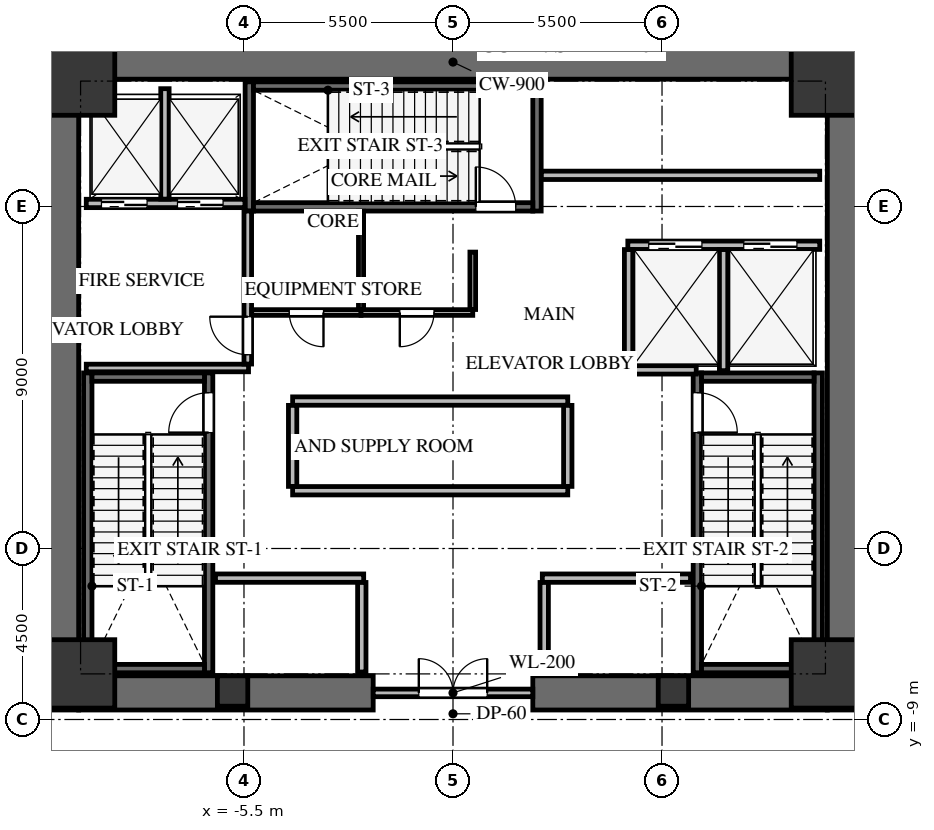
"""IFC4 building model, lengths in metres.
Left out: names, types, materials, properties, quantities, classifications, styles, units other than length and angle.
Written with IfcOpenShell. Run it as: python <this file> out.ifc"""

import sys

from ifc_helpers import new_model, si_unit, direction, frame, frame_2d, origin, origin_2d, place, context, subcontext, project, spatial, rectangle, extrude, source, transform, mapped, element, fill, save


model = new_model("IFC4")
c1 = context("Model", 3, precision=1e-05, world=origin(), true_north=direction((0.0, 1.0)))
c2 = subcontext(c1, "Body", "Model", "MODEL_VIEW")
j1 = project(units=[si_unit("LENGTHUNIT", "METRE"), si_unit("PLANEANGLEUNIT", "RADIAN")], contexts=[c1])
p1 = place(None, origin())
s1 = spatial("IfcSite", under=j1, at=p1, CompositionType="ELEMENT")
p2 = place(p1, origin())
s2 = spatial("IfcBuilding", under=s1, at=p2, CompositionType="ELEMENT")
p3 = place(p2, frame((0.0, 0.0, -5.0)))
s3 = spatial("IfcBuildingStorey", under=s2, at=p3, CompositionType="ELEMENT", Elevation=-5.0)
for number, where, z_axis, x_axis in (
    (1, (-10.3, -8.75, 0.0), (0.0, 0.0, 1.0), (0.0, 1.0, 0.0)),
    (2, (10.3, -8.75, 0.0), (0.0, 0.0, 1.0), (0.0, 1.0, 0.0)),
):
    element("IfcWall", number, at=place(p3, frame(where, z_axis=z_axis, x_axis=x_axis)), inside=s3, PredefinedType="SHEAR", context=c2, shape_type="SweptSolid", body=[
        extrude(rectangle(XDim=17.5, YDim=0.9, at=frame_2d((8.75, 0.0))), origin(), (0.0, 0.0, 1.0), 5.0),
    ])
for number, where, z_axis, x_axis in (
    (3, (-9.85, -8.3, 0.0), (0.0, 0.0, 1.0), (1.0, 0.0, 0.0)),
    (4, (2.1, -8.3, 0.0), (0.0, 0.0, 1.0), (1.0, 0.0, 0.0)),
):
    element("IfcWall", number, at=place(p3, frame(where, z_axis=z_axis, x_axis=x_axis)), inside=s3, PredefinedType="SHEAR", context=c2, shape_type="SweptSolid", body=[
        extrude(rectangle(XDim=7.75, YDim=0.9, at=frame_2d((3.875, 0.0))), origin(), (0.0, 0.0, 1.0), 5.0),
    ])
p4 = place(p3, frame((-9.85, 8.3, 0.0), z_axis=(0.0, 0.0, 1.0), x_axis=(1.0, 0.0, 0.0)))
e5 = element("IfcWall", 5, at=p4, inside=s3, PredefinedType="SHEAR", context=c2, shape_type="SweptSolid", body=[
    extrude(rectangle(XDim=19.7, YDim=0.9, at=frame_2d((9.85, 0.0))), origin(), (0.0, 0.0, 1.0), 5.0),
])
p5 = place(p3, frame((-6.43, -7.77, -0.35), z_axis=(0.0, 0.0, 1.0), x_axis=(0.0, 1.0, 0.0)))
e6 = element("IfcWall", 6, at=p5, inside=s3, PredefinedType="SHEAR", context=c2, shape_type="SweptSolid", body=[
    extrude(rectangle(XDim=7.89, YDim=0.22, at=frame_2d((3.945, 0.0))), origin(), (0.0, 0.0, 1.0), 5.05),
])
p6 = place(p5, frame((6.32, 0.0, 0.0)))
e7 = element("IfcOpeningElement", 7, at=p6, cuts=e6, PredefinedType="OPENING", context=c2, shape_type="SweptSolid", body=[
    extrude(rectangle(XDim=1.05, YDim=2.15, at=frame_2d((0.525, 1.075))), frame((0.0, 0.12, 0.0), z_axis=(0.0, -1.0, 0.0), x_axis=(1.0, 0.0, 0.0)), (0.0, 0.0, 1.0), 0.24),
])
p7 = place(p3, frame((-9.61, 0.12, -0.35), z_axis=(0.0, 0.0, 1.0), x_axis=(0.0, -1.0, 0.0)))
e8 = element("IfcWall", 8, at=p7, inside=s3, PredefinedType="SHEAR", context=c2, shape_type="SweptSolid", body=[
    extrude(rectangle(XDim=7.89, YDim=0.22, at=frame_2d((3.945, 0.0))), origin(), (0.0, 0.0, 1.0), 5.05),
])
for number, where, z_axis, x_axis in (
    (9, (-9.5, -7.66, -0.35), (0.0, 0.0, 1.0), (1.0, 0.0, 0.0)),
    (10, (-6.54, 0.01, -0.35), (0.0, 0.0, 1.0), (-1.0, 0.0, 0.0)),
):
    element("IfcWall", number, at=place(p3, frame(where, z_axis=z_axis, x_axis=x_axis)), inside=s3, PredefinedType="SHEAR", context=c2, shape_type="SweptSolid", body=[
        extrude(rectangle(XDim=2.96, YDim=0.22, at=frame_2d((1.48, 0.0))), origin(), (0.0, 0.0, 1.0), 5.05),
    ])
p8 = place(p3, frame((9.61, -7.77, -0.35), z_axis=(0.0, 0.0, 1.0), x_axis=(0.0, 1.0, 0.0)))
e11 = element("IfcWall", 11, at=p8, inside=s3, PredefinedType="SHEAR", context=c2, shape_type="SweptSolid", body=[
    extrude(rectangle(XDim=7.89, YDim=0.22, at=frame_2d((3.945, 0.0))), origin(), (0.0, 0.0, 1.0), 5.05),
])
p9 = place(p3, frame((6.43, 0.12, -0.35), z_axis=(0.0, 0.0, 1.0), x_axis=(0.0, -1.0, 0.0)))
e12 = element("IfcWall", 12, at=p9, inside=s3, PredefinedType="SHEAR", context=c2, shape_type="SweptSolid", body=[
    extrude(rectangle(XDim=7.89, YDim=0.22, at=frame_2d((3.945, 0.0))), origin(), (0.0, 0.0, 1.0), 5.05),
])
p10 = place(p9, frame((0.52, 0.0, 0.0)))
e13 = element("IfcOpeningElement", 13, at=p10, cuts=e12, PredefinedType="OPENING", context=c2, shape_type="SweptSolid", body=[
    extrude(rectangle(XDim=1.05, YDim=2.15, at=frame_2d((0.525, 1.075))), frame((0.0, 0.12, 0.0), z_axis=(0.0, -1.0, 0.0), x_axis=(1.0, 0.0, 0.0)), (0.0, 0.0, 1.0), 0.24),
])
for number, where, z_axis, x_axis in (
    (14, (6.54, -7.66, -0.35), (0.0, 0.0, 1.0), (1.0, 0.0, 0.0)),
    (15, (9.5, 0.01, -0.35), (0.0, 0.0, 1.0), (-1.0, 0.0, 0.0)),
):
    element("IfcWall", number, at=place(p3, frame(where, z_axis=z_axis, x_axis=x_axis)), inside=s3, PredefinedType="SHEAR", context=c2, shape_type="SweptSolid", body=[
        extrude(rectangle(XDim=2.96, YDim=0.22, at=frame_2d((1.48, 0.0))), origin(), (0.0, 0.0, 1.0), 5.05),
    ])
for number, where, z_axis, x_axis in (
    (16, (2.21, 4.38, -0.35), (0.0, 0.0, 1.0), (0.0, 1.0, 0.0)),
    (17, (-5.36, 7.78, -0.35), (0.0, 0.0, 1.0), (0.0, -1.0, 0.0)),
):
    element("IfcWall", number, at=place(p3, frame(where, z_axis=z_axis, x_axis=x_axis)), inside=s3, PredefinedType="SHEAR", context=c2, shape_type="SweptSolid", body=[
        extrude(rectangle(XDim=3.4, YDim=0.22, at=frame_2d((1.7, 0.0))), origin(), (0.0, 0.0, 1.0), 5.05),
    ])
p11 = place(p3, frame((-5.25, 4.49, -0.35), z_axis=(0.0, 0.0, 1.0), x_axis=(1.0, 0.0, 0.0)))
e18 = element("IfcWall", 18, at=p11, inside=s3, PredefinedType="SHEAR", context=c2, shape_type="SweptSolid", body=[
    extrude(rectangle(XDim=7.35, YDim=0.22, at=frame_2d((3.675, 0.0))), origin(), (0.0, 0.0, 1.0), 5.05),
])
p12 = place(p11, frame((5.85, 0.0, 0.0)))
e19 = element("IfcOpeningElement", 19, at=p12, cuts=e18, PredefinedType="OPENING", context=c2, shape_type="SweptSolid", body=[
    extrude(rectangle(XDim=1.05, YDim=2.15, at=frame_2d((0.525, 1.075))), frame((0.0, 0.12, 0.0), z_axis=(0.0, -1.0, 0.0), x_axis=(1.0, 0.0, 0.0)), (0.0, 0.0, 1.0), 0.24),
])
p13 = place(p3, frame((2.1, 7.67, -0.35), z_axis=(0.0, 0.0, 1.0), x_axis=(-1.0, 0.0, 0.0)))
e20 = element("IfcWall", 20, at=p13, inside=s3, PredefinedType="SHEAR", context=c2, shape_type="SweptSolid", body=[
    extrude(rectangle(XDim=7.35, YDim=0.22, at=frame_2d((3.675, 0.0))), origin(), (0.0, 0.0, 1.0), 5.05),
])
m1 = source(origin(), c2, "Body", "SweptSolid", [
    extrude(rectangle(XDim=1.8, YDim=1.8, at=origin_2d()), origin(), (0.0, 0.0, 1.0), 5.05),
])
for number, where, z_axis, x_axis in (
    (21, (-9.8, -7.8, -0.35), (0.0, 0.0, 1.0), (1.0, 0.0, 0.0)),
    (22, (9.8, -7.8, -0.35), (0.0, 0.0, 1.0), (1.0, 0.0, 0.0)),
    (23, (9.8, 7.8, -0.35), (0.0, 0.0, 1.0), (1.0, 0.0, 0.0)),
    (24, (-9.8, 7.8, -0.35), (0.0, 0.0, 1.0), (1.0, 0.0, 0.0)),
):
    element("IfcColumn", number, at=place(p3, frame(where, z_axis=z_axis, x_axis=x_axis)), inside=s3, PredefinedType="COLUMN", context=c2, shape_type="MappedRepresentation", body=[
        mapped(m1, transform((0.0, 0.0, 0.0), x_axis=(1.0, 0.0, 0.0), y_axis=(0.0, 1.0, 0.0), z_axis=(0.0, 0.0, 1.0), scale=1.0)),
    ])
m2 = source(origin(), c2, "Body", "SweptSolid", [
    extrude(rectangle(XDim=0.8, YDim=0.8, at=origin_2d()), origin(), (0.0, 0.0, 1.0), 5.05),
])
for number, where, z_axis, x_axis in (
    (25, (-5.8, -8.25, -0.35), (0.0, 0.0, 1.0), (1.0, 0.0, 0.0)),
    (26, (5.8, -8.25, -0.35), (0.0, 0.0, 1.0), (1.0, 0.0, 0.0)),
):
    element("IfcColumn", number, at=place(p3, frame(where, z_axis=z_axis, x_axis=x_axis)), inside=s3, PredefinedType="PILASTER", context=c2, shape_type="MappedRepresentation", body=[
        mapped(m2, transform((0.0, 0.0, 0.0), x_axis=(1.0, 0.0, 0.0), y_axis=(0.0, 1.0, 0.0), z_axis=(0.0, 0.0, 1.0), scale=1.0)),
    ])
p14 = place(p3, frame((-2.1, -8.3, 0.0), z_axis=(0.0, 0.0, 1.0), x_axis=(1.0, 0.0, 0.0)))
e27 = element("IfcWall", 27, at=p14, inside=s3, PredefinedType="SOLIDWALL", context=c2, shape_type="SweptSolid", body=[
    extrude(rectangle(XDim=4.2, YDim=0.2, at=frame_2d((2.1, 0.0))), origin(), (0.0, 0.0, 1.0), 4.685),
])
p15 = place(p14, frame((1.2, 0.0, 0.0)))
e28 = element("IfcOpeningElement", 28, at=p15, cuts=e27, PredefinedType="OPENING", context=c2, shape_type="SweptSolid", body=[
    extrude(rectangle(XDim=1.8, YDim=2.15, at=frame_2d((0.9, 1.075))), frame((0.0, 0.11, 0.0), z_axis=(0.0, -1.0, 0.0), x_axis=(1.0, 0.0, 0.0)), (0.0, 0.0, 1.0), 0.22),
])
p16 = place(p3, frame((-9.65, 4.58, 0.0), z_axis=(0.0, 0.0, 1.0), x_axis=(1.0, 0.0, 0.0)))
e29 = element("IfcWall", 29, at=p16, inside=s3, PredefinedType="SOLIDWALL", context=c2, shape_type="SweptSolid", body=[
    extrude(rectangle(XDim=4.175, YDim=0.22, at=frame_2d((2.087, 0.0))), origin(), (0.0, 0.0, 1.0), 4.685),
])
p17 = place(p16, frame((0.4, 0.0, 0.0)))
e30 = element("IfcOpeningElement", 30, at=p17, cuts=e29, PredefinedType="OPENING", context=c2, shape_type="SweptSolid", body=[
    extrude(rectangle(XDim=1.2, YDim=2.15, at=frame_2d((0.6, 1.075))), frame((0.0, 0.12, 0.0), z_axis=(0.0, -1.0, 0.0), x_axis=(1.0, 0.0, 0.0)), (0.0, 0.0, 1.0), 0.24),
])
p18 = place(p16, frame((2.4, 0.0, 0.0)))
e31 = element("IfcOpeningElement", 31, at=p18, cuts=e29, PredefinedType="OPENING", context=c2, shape_type="SweptSolid", body=[
    extrude(rectangle(XDim=1.2, YDim=2.15, at=frame_2d((0.6, 1.075))), frame((0.0, 0.12, 0.0), z_axis=(0.0, -1.0, 0.0), x_axis=(1.0, 0.0, 0.0)), (0.0, 0.0, 1.0), 0.24),
])
p19 = place(p3, frame((-7.58, 4.694, 0.0), z_axis=(0.0, 0.0, 1.0), x_axis=(0.0, 1.0, 0.0)))
e32 = element("IfcWall", 32, at=p19, inside=s3, PredefinedType="SOLIDWALL", context=c2, shape_type="SweptSolid", body=[
    extrude(rectangle(XDim=2.906, YDim=0.22, at=frame_2d((1.453, 0.0))), origin(), (0.0, 0.0, 1.0), 4.685),
])
p20 = place(p3, frame((-9.65, 0.25, 0.0), z_axis=(0.0, 0.0, 1.0), x_axis=(1.0, 0.0, 0.0)))
e33 = element("IfcWall", 33, at=p20, inside=s3, PredefinedType="SOLIDWALL", context=c2, shape_type="SweptSolid", body=[
    extrude(rectangle(XDim=4.27, YDim=0.2, at=frame_2d((2.135, 0.0))), origin(), (0.0, 0.0, 1.0), 4.685),
])
p21 = place(p3, frame((-5.4, 0.354, 0.0), z_axis=(0.0, 0.0, 1.0), x_axis=(0.0, 1.0, 0.0)))
e34 = element("IfcWall", 34, at=p21, inside=s3, PredefinedType="SOLIDWALL", context=c2, shape_type="SweptSolid", body=[
    extrude(rectangle(XDim=4.026, YDim=0.2, at=frame_2d((2.013, 0.0))), origin(), (0.0, 0.0, 1.0), 4.685),
])
p22 = place(p21, frame((0.246, 0.0, 0.0)))
e35 = element("IfcOpeningElement", 35, at=p22, cuts=e34, PredefinedType="OPENING", context=c2, shape_type="SweptSolid", body=[
    extrude(rectangle(XDim=1.0, YDim=2.15, at=frame_2d((0.5, 1.075))), frame((0.0, 0.11, 0.0), z_axis=(0.0, -1.0, 0.0), x_axis=(1.0, 0.0, 0.0)), (0.0, 0.0, 1.0), 0.22),
])
p23 = place(p3, frame((4.6, 3.48, 0.0), z_axis=(0.0, 0.0, 1.0), x_axis=(1.0, 0.0, 0.0)))
e36 = element("IfcWall", 36, at=p23, inside=s3, PredefinedType="SOLIDWALL", context=c2, shape_type="SweptSolid", body=[
    extrude(rectangle(XDim=5.05, YDim=0.22, at=frame_2d((2.525, 0.0))), origin(), (0.0, 0.0, 1.0), 4.685),
])
p24 = place(p23, frame((0.55, 0.0, 0.0)))
e37 = element("IfcOpeningElement", 37, at=p24, cuts=e36, PredefinedType="OPENING", context=c2, shape_type="SweptSolid", body=[
    extrude(rectangle(XDim=1.4, YDim=2.15, at=frame_2d((0.7, 1.075))), frame((0.0, 0.12, 0.0), z_axis=(0.0, -1.0, 0.0), x_axis=(1.0, 0.0, 0.0)), (0.0, 0.0, 1.0), 0.24),
])
p25 = place(p23, frame((3.05, 0.0, 0.0)))
e38 = element("IfcOpeningElement", 38, at=p25, cuts=e36, PredefinedType="OPENING", context=c2, shape_type="SweptSolid", body=[
    extrude(rectangle(XDim=1.4, YDim=2.15, at=frame_2d((0.7, 1.075))), frame((0.0, 0.12, 0.0), z_axis=(0.0, -1.0, 0.0), x_axis=(1.0, 0.0, 0.0)), (0.0, 0.0, 1.0), 0.24),
])
for number, where, z_axis, x_axis in (
    (39, (4.62, 0.18, 0.0), (0.0, 0.0, 1.0), (0.0, 1.0, 0.0)),
    (40, (7.12, 0.18, 0.0), (0.0, 0.0, 1.0), (0.0, 1.0, 0.0)),
):
    element("IfcWall", number, at=place(p3, frame(where, z_axis=z_axis, x_axis=x_axis)), inside=s3, PredefinedType="SOLIDWALL", context=c2, shape_type="SweptSolid", body=[
        extrude(rectangle(XDim=3.186, YDim=0.22, at=frame_2d((1.593, 0.0))), origin(), (0.0, 0.0, 1.0), 4.685),
    ])
p26 = place(p3, frame((4.734, 0.2, 0.0), z_axis=(0.0, 0.0, 1.0), x_axis=(1.0, 0.0, 0.0)))
e41 = element("IfcWall", 41, at=p26, inside=s3, PredefinedType="SOLIDWALL", context=c2, shape_type="SweptSolid", body=[
    extrude(rectangle(XDim=1.666, YDim=0.22, at=frame_2d((0.833, 0.0))), origin(), (0.0, 0.0, 1.0), 4.685),
])
for number, where, z_axis, x_axis in (
    (42, (-6.25, -5.28, 0.0), (0.0, 0.0, 1.0), (1.0, 0.0, 0.0)),
    (43, (2.35, -5.28, 0.0), (0.0, 0.0, 1.0), (1.0, 0.0, 0.0)),
):
    element("IfcWall", number, at=place(p3, frame(where, z_axis=z_axis, x_axis=x_axis)), inside=s3, PredefinedType="SOLIDWALL", context=c2, shape_type="SweptSolid", body=[
        extrude(rectangle(XDim=3.9, YDim=0.22, at=frame_2d((1.95, 0.0))), origin(), (0.0, 0.0, 1.0), 4.685),
    ])
for number, where, z_axis, x_axis in (
    (44, (-2.4, -7.75, 0.0), (0.0, 0.0, 1.0), (0.0, 1.0, 0.0)),
    (45, (2.4, -7.75, 0.0), (0.0, 0.0, 1.0), (0.0, 1.0, 0.0)),
):
    element("IfcWall", number, at=place(p3, frame(where, z_axis=z_axis, x_axis=x_axis)), inside=s3, PredefinedType="SOLIDWALL", context=c2, shape_type="SweptSolid", body=[
        extrude(rectangle(XDim=2.356, YDim=0.22, at=frame_2d((1.178, 0.0))), origin(), (0.0, 0.0, 1.0), 4.685),
    ])
for number, where, z_axis, x_axis in (
    (46, (-4.22, -2.98, 0.0), (0.0, 0.0, 1.0), (1.0, 0.0, 0.0)),
    (47, (-4.22, -0.62, 0.0), (0.0, 0.0, 1.0), (1.0, 0.0, 0.0)),
):
    element("IfcWall", number, at=place(p3, frame(where, z_axis=z_axis, x_axis=x_axis)), inside=s3, PredefinedType="SOLIDWALL", context=c2, shape_type="SweptSolid", body=[
        extrude(rectangle(XDim=7.24, YDim=0.22, at=frame_2d((3.62, 0.0))), origin(), (0.0, 0.0, 1.0), 4.685),
    ])
for number, where, z_axis, x_axis in (
    (48, (-4.22, -2.866, 0.0), (0.0, 0.0, 1.0), (0.0, 1.0, 0.0)),
    (49, (3.02, -2.866, 0.0), (0.0, 0.0, 1.0), (0.0, 1.0, 0.0)),
):
    element("IfcWall", number, at=place(p3, frame(where, z_axis=z_axis, x_axis=x_axis)), inside=s3, PredefinedType="SOLIDWALL", context=c2, shape_type="SweptSolid", body=[
        extrude(rectangle(XDim=2.132, YDim=0.22, at=frame_2d((1.066, 0.0))), origin(), (0.0, 0.0, 1.0), 4.685),
    ])
p27 = place(p3, frame((2.325, 5.32, 0.0), z_axis=(0.0, 0.0, 1.0), x_axis=(1.0, 0.0, 0.0)))
e50 = element("IfcWall", 50, at=p27, inside=s3, PredefinedType="SOLIDWALL", context=c2, shape_type="SweptSolid", body=[
    extrude(rectangle(XDim=7.325, YDim=0.22, at=frame_2d((3.663, 0.0))), origin(), (0.0, 0.0, 1.0), 4.685),
])
p28 = place(p3, frame((-2.42, 1.71, 0.0), z_axis=(0.0, 0.0, 1.0), x_axis=(-1.0, 0.0, 0.0)))
e51 = element("IfcWall", 51, at=p28, inside=s3, PredefinedType="PARTITIONING", context=c2, shape_type="SweptSolid", body=[
    extrude(rectangle(XDim=2.876, YDim=0.15, at=frame_2d((1.438, 0.0))), origin(), (0.0, 0.0, 1.0), 4.685),
])
p29 = place(p28, frame((0.988, 0.0, 0.0)))
e52 = element("IfcOpeningElement", 52, at=p29, cuts=e51, PredefinedType="OPENING", context=c2, shape_type="SweptSolid", body=[
    extrude(rectangle(XDim=0.9, YDim=2.05, at=frame_2d((0.45, 1.025))), frame((0.0, 0.085, 0.0), z_axis=(0.0, -1.0, 0.0), x_axis=(1.0, 0.0, 0.0)), (0.0, 0.0, 1.0), 0.17),
])
p30 = place(p3, frame((0.52, 1.71, 0.0), z_axis=(0.0, 0.0, 1.0), x_axis=(-1.0, 0.0, 0.0)))
e53 = element("IfcWall", 53, at=p30, inside=s3, PredefinedType="PARTITIONING", context=c2, shape_type="SweptSolid", body=[
    extrude(rectangle(XDim=2.94, YDim=0.15, at=frame_2d((1.47, 0.0))), origin(), (0.0, 0.0, 1.0), 4.685),
])
p31 = place(p30, frame((1.02, 0.0, 0.0)))
e54 = element("IfcOpeningElement", 54, at=p31, cuts=e53, PredefinedType="OPENING", context=c2, shape_type="SweptSolid", body=[
    extrude(rectangle(XDim=0.9, YDim=2.05, at=frame_2d((0.45, 1.025))), frame((0.0, 0.085, 0.0), z_axis=(0.0, -1.0, 0.0), x_axis=(1.0, 0.0, 0.0)), (0.0, 0.0, 1.0), 0.17),
])
p32 = place(p3, frame((0.52, 3.3, 0.0), z_axis=(0.0, 0.0, 1.0), x_axis=(0.0, -1.0, 0.0)))
e55 = element("IfcWall", 55, at=p32, inside=s3, PredefinedType="PARTITIONING", context=c2, shape_type="SweptSolid", body=[
    extrude(rectangle(XDim=1.511, YDim=0.15, at=frame_2d((0.755, 0.0))), origin(), (0.0, 0.0, 1.0), 4.685),
])
p33 = place(p3, frame((-2.42, 4.375, 0.0), z_axis=(0.0, 0.0, 1.0), x_axis=(0.0, -1.0, 0.0)))
e56 = element("IfcWall", 56, at=p33, inside=s3, PredefinedType="PARTITIONING", context=c2, shape_type="SweptSolid", body=[
    extrude(rectangle(XDim=2.586, YDim=0.135, at=frame_2d((1.293, 0.0))), origin(), (0.0, 0.0, 1.0), 4.685),
])
m3 = source(origin(), c2, "Body", "SweptSolid", [
    extrude(rectangle(XDim=1.05, YDim=2.15, at=frame_2d((0.525, 1.075))), frame((0.0, 0.025, 0.0), z_axis=(0.0, -1.0, 0.0), x_axis=(1.0, 0.0, 0.0)), (0.0, 0.0, 1.0), 0.05),
])
p34 = place(p6, origin())
e57 = element("IfcDoor", 57, at=p34, inside=s3, OperationType="SINGLE_SWING_LEFT", PredefinedType="DOOR", context=c2, shape_type="MappedRepresentation", body=[
    mapped(m3, transform((0.0, 0.0, 0.0), x_axis=(1.0, 0.0, 0.0), y_axis=(0.0, 1.0, 0.0), z_axis=(0.0, 0.0, 1.0), scale=1.0)),
])
fill(e7, e57)
m4 = source(origin(), c2, "Body", "SweptSolid", [
    extrude(rectangle(XDim=1.05, YDim=2.15, at=frame_2d((0.525, 1.075))), frame((0.0, 0.025, 0.0), z_axis=(0.0, -1.0, 0.0), x_axis=(1.0, 0.0, 0.0)), (0.0, 0.0, 1.0), 0.05),
])
p35 = place(p10, origin())
e58 = element("IfcDoor", 58, at=p35, inside=s3, OperationType="SINGLE_SWING_RIGHT", PredefinedType="DOOR", context=c2, shape_type="MappedRepresentation", body=[
    mapped(m4, transform((0.0, 0.0, 0.0), x_axis=(1.0, 0.0, 0.0), y_axis=(0.0, 1.0, 0.0), z_axis=(0.0, 0.0, 1.0), scale=1.0)),
])
fill(e13, e58)
p36 = place(p12, origin())
e59 = element("IfcDoor", 59, at=p36, inside=s3, OperationType="SINGLE_SWING_LEFT", PredefinedType="DOOR", context=c2, shape_type="MappedRepresentation", body=[
    mapped(m3, transform((0.0, 0.0, 0.0), x_axis=(1.0, 0.0, 0.0), y_axis=(0.0, 1.0, 0.0), z_axis=(0.0, 0.0, 1.0), scale=1.0)),
])
fill(e19, e59)
m5 = source(origin(), c2, "Body", "SweptSolid", [
    extrude(rectangle(XDim=1.8, YDim=2.15, at=frame_2d((0.9, 1.075))), frame((0.0, 0.025, 0.0), z_axis=(0.0, -1.0, 0.0), x_axis=(1.0, 0.0, 0.0)), (0.0, 0.0, 1.0), 0.05),
])
p37 = place(p15, origin())
e60 = element("IfcDoor", 60, at=p37, inside=s3, OperationType="DOUBLE_DOOR_SINGLE_SWING", PredefinedType="DOOR", context=c2, shape_type="MappedRepresentation", body=[
    mapped(m5, transform((0.0, 0.0, 0.0), x_axis=(1.0, 0.0, 0.0), y_axis=(0.0, 1.0, 0.0), z_axis=(0.0, 0.0, 1.0), scale=1.0)),
])
fill(e28, e60)
m6 = source(origin(), c2, "Body", "SweptSolid", [
    extrude(rectangle(XDim=1.2, YDim=2.15, at=frame_2d((0.6, 1.075))), frame((0.0, 0.025, 0.0), z_axis=(0.0, -1.0, 0.0), x_axis=(1.0, 0.0, 0.0)), (0.0, 0.0, 1.0), 0.05),
])
p38 = place(p17, origin())
e61 = element("IfcDoor", 61, at=p38, inside=s3, OperationType="DOUBLE_DOOR_SLIDING", PredefinedType="DOOR", context=c2, shape_type="MappedRepresentation", body=[
    mapped(m6, transform((0.0, 0.0, 0.0), x_axis=(1.0, 0.0, 0.0), y_axis=(0.0, 1.0, 0.0), z_axis=(0.0, 0.0, 1.0), scale=1.0)),
])
fill(e30, e61)
p39 = place(p18, origin())
e62 = element("IfcDoor", 62, at=p39, inside=s3, OperationType="DOUBLE_DOOR_SLIDING", PredefinedType="DOOR", context=c2, shape_type="MappedRepresentation", body=[
    mapped(m6, transform((0.0, 0.0, 0.0), x_axis=(1.0, 0.0, 0.0), y_axis=(0.0, 1.0, 0.0), z_axis=(0.0, 0.0, 1.0), scale=1.0)),
])
fill(e31, e62)
m7 = source(origin(), c2, "Body", "SweptSolid", [
    extrude(rectangle(XDim=1.0, YDim=2.15, at=frame_2d((0.5, 1.075))), frame((0.0, 0.025, 0.0), z_axis=(0.0, -1.0, 0.0), x_axis=(1.0, 0.0, 0.0)), (0.0, 0.0, 1.0), 0.05),
])
p40 = place(p22, origin())
e63 = element("IfcDoor", 63, at=p40, inside=s3, OperationType="SINGLE_SWING_RIGHT", PredefinedType="DOOR", context=c2, shape_type="MappedRepresentation", body=[
    mapped(m7, transform((0.0, 0.0, 0.0), x_axis=(1.0, 0.0, 0.0), y_axis=(0.0, 1.0, 0.0), z_axis=(0.0, 0.0, 1.0), scale=1.0)),
])
fill(e35, e63)
m8 = source(origin(), c2, "Body", "SweptSolid", [
    extrude(rectangle(XDim=1.4, YDim=2.15, at=frame_2d((0.7, 1.075))), frame((0.0, 0.025, 0.0), z_axis=(0.0, -1.0, 0.0), x_axis=(1.0, 0.0, 0.0)), (0.0, 0.0, 1.0), 0.05),
])
p41 = place(p24, origin())
e64 = element("IfcDoor", 64, at=p41, inside=s3, OperationType="DOUBLE_DOOR_SLIDING", PredefinedType="DOOR", context=c2, shape_type="MappedRepresentation", body=[
    mapped(m8, transform((0.0, 0.0, 0.0), x_axis=(1.0, 0.0, 0.0), y_axis=(0.0, 1.0, 0.0), z_axis=(0.0, 0.0, 1.0), scale=1.0)),
])
fill(e37, e64)
p42 = place(p25, origin())
e65 = element("IfcDoor", 65, at=p42, inside=s3, OperationType="DOUBLE_DOOR_SLIDING", PredefinedType="DOOR", context=c2, shape_type="MappedRepresentation", body=[
    mapped(m8, transform((0.0, 0.0, 0.0), x_axis=(1.0, 0.0, 0.0), y_axis=(0.0, 1.0, 0.0), z_axis=(0.0, 0.0, 1.0), scale=1.0)),
])
fill(e38, e65)
m9 = source(origin(), c2, "Body", "SweptSolid", [
    extrude(rectangle(XDim=0.9, YDim=2.05, at=frame_2d((0.45, 1.025))), frame((0.0, 0.025, 0.0), z_axis=(0.0, -1.0, 0.0), x_axis=(1.0, 0.0, 0.0)), (0.0, 0.0, 1.0), 0.05),
])
p43 = place(p29, origin())
e66 = element("IfcDoor", 66, at=p43, inside=s3, OperationType="SINGLE_SWING_LEFT", PredefinedType="DOOR", context=c2, shape_type="MappedRepresentation", body=[
    mapped(m9, transform((0.0, 0.0, 0.0), x_axis=(1.0, 0.0, 0.0), y_axis=(0.0, 1.0, 0.0), z_axis=(0.0, 0.0, 1.0), scale=1.0)),
])
fill(e52, e66)
m10 = source(origin(), c2, "Body", "SweptSolid", [
    extrude(rectangle(XDim=0.9, YDim=2.05, at=frame_2d((0.45, 1.025))), frame((0.0, 0.025, 0.0), z_axis=(0.0, -1.0, 0.0), x_axis=(1.0, 0.0, 0.0)), (0.0, 0.0, 1.0), 0.05),
])
p44 = place(p31, origin())
e67 = element("IfcDoor", 67, at=p44, inside=s3, OperationType="SINGLE_SWING_RIGHT", PredefinedType="DOOR", context=c2, shape_type="MappedRepresentation", body=[
    mapped(m10, transform((0.0, 0.0, 0.0), x_axis=(1.0, 0.0, 0.0), y_axis=(0.0, 1.0, 0.0), z_axis=(0.0, 0.0, 1.0), scale=1.0)),
])
fill(e54, e67)
save(model, sys.argv[1])
